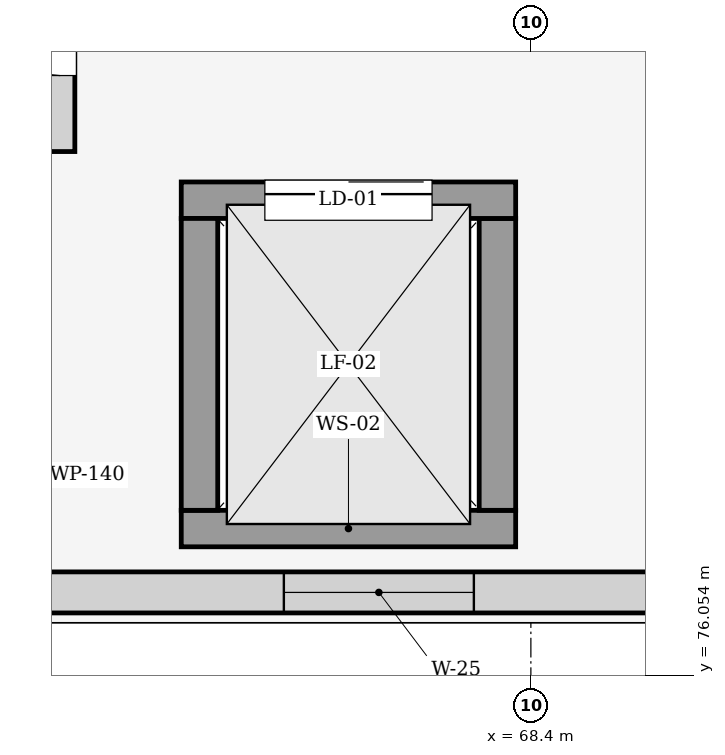
"""IFC4 building model, lengths in metres.
Left out: names, types, materials, properties, quantities, classifications, styles, units other than length and angle.
Written with IfcOpenShell. Run it as: python <this file> out.ifc"""

import sys

from ifc_helpers import new_model, si_unit, direction, frame, frame_2d, origin, place, context, subcontext, project, spatial, rectangle, extrude, element, fill, save


model = new_model("IFC4")
c1 = context("Model", 3, precision=1e-05, world=origin(), true_north=direction((0.0, 1.0)))
c2 = subcontext(c1, "Body", "Model", "MODEL_VIEW")
j1 = project(units=[si_unit("LENGTHUNIT", "METRE"), si_unit("PLANEANGLEUNIT", "RADIAN")], contexts=[c1])
p1 = place(None, origin())
s1 = spatial("IfcSite", under=j1, at=p1, CompositionType="ELEMENT")
p2 = place(p1, origin())
s2 = spatial("IfcBuilding", under=s1, at=p2, CompositionType="ELEMENT")
p3 = place(p2, frame((0.0, 0.0, 29.4)))
s3 = spatial("IfcBuildingStorey", under=s2, at=p3, CompositionType="ELEMENT", Elevation=29.4)
p4 = place(p3, frame((69.915, 76.6, 0.0), z_axis=(0.0, 0.0, 1.0), x_axis=(-1.0, 0.0, 0.0)))
e1 = element("IfcWall", 1, at=p4, inside=s3, PredefinedType="STANDARD", context=c2, shape_type="SweptSolid", body=[
    extrude(rectangle(XDim=5.03, YDim=0.27, at=frame_2d((2.515, 0.0))), origin(), (0.0, 0.0, 1.0), 4.425),
])
p5 = place(p4, frame((1.89, 0.0, 0.85)))
e2 = element("IfcOpeningElement", 2, at=p5, cuts=e1, PredefinedType="OPENING", context=c2, shape_type="SweptSolid", body=[
    extrude(rectangle(XDim=1.25, YDim=1.85, at=frame_2d((0.625, 0.925))), frame((0.0, 0.145, 0.0), z_axis=(0.0, -1.0, 0.0), x_axis=(1.0, 0.0, 0.0)), (0.0, 0.0, 1.0), 0.29),
])
p6 = place(p3, frame((68.3, 77.02, 0.0), z_axis=(0.0, 0.0, 1.0), x_axis=(-1.0, 0.0, 0.0)))
e3 = element("IfcWall", 3, at=p6, inside=s3, PredefinedType="SHEAR", context=c2, shape_type="SweptSolid", body=[
    extrude(rectangle(XDim=2.2, YDim=0.24, at=frame_2d((1.1, 0.0))), origin(), (0.0, 0.0, 1.0), 4.75),
])
p7 = place(p3, frame((68.18, 79.06, 0.0), z_axis=(0.0, 0.0, 1.0), x_axis=(0.0, -1.0, 0.0)))
e4 = element("IfcWall", 4, at=p7, inside=s3, PredefinedType="SHEAR", context=c2, shape_type="SweptSolid", body=[
    extrude(rectangle(XDim=1.92, YDim=0.24, at=frame_2d((0.96, 0.0))), origin(), (0.0, 0.0, 1.0), 4.75),
])
p8 = place(p3, frame((66.1, 79.18, 0.0), z_axis=(0.0, 0.0, 1.0), x_axis=(1.0, 0.0, 0.0)))
e5 = element("IfcWall", 5, at=p8, inside=s3, PredefinedType="SHEAR", context=c2, shape_type="SweptSolid", body=[
    extrude(rectangle(XDim=2.2, YDim=0.24, at=frame_2d((1.1, 0.0))), origin(), (0.0, 0.0, 1.0), 4.75),
])
p9 = place(p8, frame((0.55, 0.0, 0.0)))
e6 = element("IfcOpeningElement", 6, at=p9, cuts=e5, PredefinedType="OPENING", context=c2, shape_type="SweptSolid", body=[
    extrude(rectangle(XDim=1.1, YDim=2.15, at=frame_2d((0.55, 1.075))), frame((0.0, 0.13, 0.0), z_axis=(0.0, -1.0, 0.0), x_axis=(1.0, 0.0, 0.0)), (0.0, 0.0, 1.0), 0.26),
])
p10 = place(p3, frame((66.22, 77.14, 0.0), z_axis=(0.0, 0.0, 1.0), x_axis=(0.0, 1.0, 0.0)))
e7 = element("IfcWall", 7, at=p10, inside=s3, PredefinedType="SHEAR", context=c2, shape_type="SweptSolid", body=[
    extrude(rectangle(XDim=1.92, YDim=0.24, at=frame_2d((0.96, 0.0))), origin(), (0.0, 0.0, 1.0), 4.75),
])
p11 = place(p3, frame((65.3, 79.5, 0.0), z_axis=(0.0, 0.0, 1.0), x_axis=(0.0, 1.0, 0.0)))
e8 = element("IfcWall", 8, at=p11, inside=s3, PredefinedType="PARTITIONING", context=c2, shape_type="SweptSolid", body=[
    extrude(rectangle(XDim=2.3, YDim=0.2, at=frame_2d((1.15, 0.0))), origin(), (0.0, 0.0, 1.0), 2.9),
])
p12 = place(p11, frame((0.5, 0.0, 0.0)))
e9 = element("IfcOpeningElement", 9, at=p12, cuts=e8, PredefinedType="OPENING", context=c2, shape_type="SweptSolid", body=[
    extrude(rectangle(XDim=1.3, YDim=2.2, at=frame_2d((0.65, 1.1))), frame((0.0, 0.11, 0.0), z_axis=(0.0, -1.0, 0.0), x_axis=(1.0, 0.0, 0.0)), (0.0, 0.0, 1.0), 0.22),
])
p13 = place(p5, origin())
e10 = element("IfcWindow", 10, at=p13, inside=s3, PartitioningType="SINGLE_PANEL", PredefinedType="WINDOW", context=c2, shape_type="SweptSolid", body=[
    extrude(rectangle(XDim=1.25, YDim=1.85, at=frame_2d((0.625, 0.925))), frame((0.0, 0.03, 0.0), z_axis=(0.0, -1.0, 0.0), x_axis=(1.0, 0.0, 0.0)), (0.0, 0.0, 1.0), 0.06),
])
fill(e2, e10)
p14 = place(p9, origin())
e11 = element("IfcDoor", 11, at=p14, inside=s3, OperationType="SLIDING_TO_RIGHT", PredefinedType="DOOR", context=c2, shape_type="SweptSolid", body=[
    extrude(rectangle(XDim=1.1, YDim=2.15, at=frame_2d((0.55, 1.075))), frame((0.0, 0.025, 0.0), z_axis=(0.0, -1.0, 0.0), x_axis=(1.0, 0.0, 0.0)), (0.0, 0.0, 1.0), 0.05),
])
fill(e6, e11)
p15 = place(p12, origin())
e12 = element("IfcDoor", 12, at=p15, inside=s3, OperationType="SINGLE_SWING_RIGHT", PredefinedType="DOOR", context=c2, shape_type="SweptSolid", body=[
    extrude(rectangle(XDim=1.3, YDim=2.2, at=frame_2d((0.65, 1.1))), frame((0.0, 0.025, 0.0), z_axis=(0.0, -1.0, 0.0), x_axis=(1.0, 0.0, 0.0)), (0.0, 0.0, 1.0), 0.05),
])
fill(e9, e12)
save(model, sys.argv[1])
